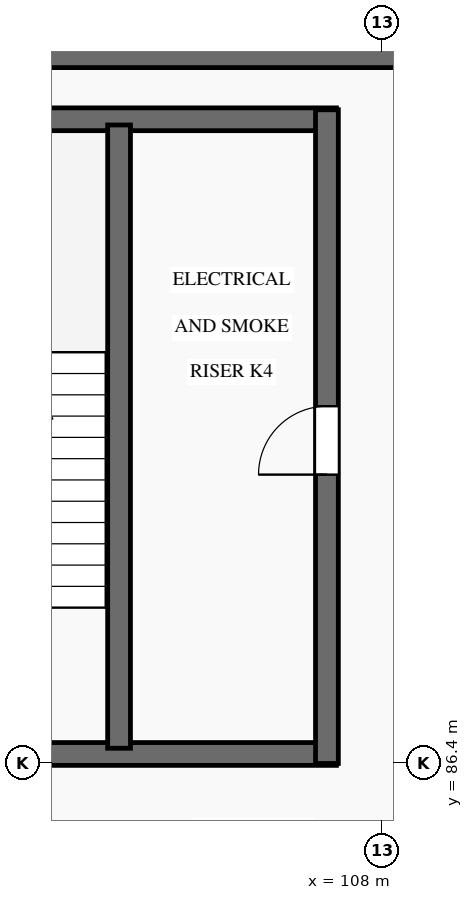
"""IFC4 building model, lengths in metres.
Left out: names, types, materials, properties, quantities, classifications, styles, units other than length and angle.
Written with IfcOpenShell. Run it as: python <this file> out.ifc"""

import sys

from ifc_helpers import new_model, si_unit, direction, frame, frame_2d, origin, place, context, subcontext, project, spatial, rectangle, extrude, element, fill, save


model = new_model("IFC4")
c1 = context("Model", 3, precision=1e-05, world=origin(), true_north=direction((0.0, 1.0)))
c2 = subcontext(c1, "Body", "Model", "MODEL_VIEW")
j1 = project(units=[si_unit("LENGTHUNIT", "METRE"), si_unit("PLANEANGLEUNIT", "RADIAN")], contexts=[c1])
p1 = place(None, origin())
s1 = spatial("IfcSite", under=j1, at=p1, CompositionType="ELEMENT")
p2 = place(p1, origin())
s2 = spatial("IfcBuilding", under=s1, at=p2, CompositionType="ELEMENT")
p3 = place(p2, frame((0.0, 0.0, -4.5)))
s3 = spatial("IfcBuildingStorey", under=s2, at=p3, CompositionType="ELEMENT", Elevation=-4.5)
p4 = place(p3, frame((116.78, 95.78, 0.0), z_axis=(0.0, 0.0, 1.0), x_axis=(-1.0, 0.0, 0.0)))
e1 = element("IfcWall", 1, at=p4, inside=s3, PredefinedType="SHEAR", context=c2, shape_type="SweptSolid", body=[
    extrude(rectangle(XDim=44.4, YDim=0.45, at=frame_2d((22.2, 0.0))), origin(), (0.0, 0.0, 1.0), 4.2),
])
for number, where, z_axis, x_axis in (
    (2, (100.4, 86.525, 0.0), (0.0, 0.0, 1.0), (1.0, 0.0, 0.0)),
    (3, (100.4, 94.875, 0.0), (0.0, 0.0, 1.0), (1.0, 0.0, 0.0)),
):
    element("IfcWall", number, at=place(p3, frame(where, z_axis=z_axis, x_axis=x_axis)), inside=s3, PredefinedType="SHEAR", context=c2, shape_type="SweptSolid", body=[
        extrude(rectangle(XDim=7.0, YDim=0.3, at=frame_2d((3.5, 0.0))), origin(), (0.0, 0.0, 1.0), 4.5),
    ])
p5 = place(p3, frame((107.275, 86.4, 0.0), z_axis=(0.0, 0.0, 1.0), x_axis=(0.0, 1.0, 0.0)))
e4 = element("IfcWall", 4, at=p5, inside=s3, PredefinedType="SHEAR", context=c2, shape_type="SweptSolid", body=[
    extrude(rectangle(XDim=8.6, YDim=0.3, at=frame_2d((4.3, 0.0))), origin(), (0.0, 0.0, 1.0), 4.5),
])
p6 = place(p5, frame((3.8, 0.0, 0.0)))
e5 = element("IfcOpeningElement", 5, at=p6, cuts=e4, PredefinedType="OPENING", context=c2, shape_type="SweptSolid", body=[
    extrude(rectangle(XDim=0.9, YDim=2.05, at=frame_2d((0.45, 1.025))), frame((0.0, 0.165, 0.0), z_axis=(0.0, -1.0, 0.0), x_axis=(1.0, 0.0, 0.0)), (0.0, 0.0, 1.0), 0.33),
])
p7 = place(p3, frame((104.54, 86.6, 0.0), z_axis=(0.0, 0.0, 1.0), x_axis=(0.0, 1.0, 0.0)))
e6 = element("IfcWall", 6, at=p7, inside=s3, PredefinedType="SHEAR", context=c2, shape_type="SweptSolid", body=[
    extrude(rectangle(XDim=8.2, YDim=0.3, at=frame_2d((4.1, 0.0))), origin(), (0.0, 0.0, 1.0), 4.5),
])
p8 = place(p6, origin())
e7 = element("IfcDoor", 7, at=p8, inside=s3, OperationType="SINGLE_SWING_LEFT", PredefinedType="DOOR", context=c2, shape_type="SweptSolid", body=[
    extrude(rectangle(XDim=0.9, YDim=2.05, at=frame_2d((0.45, 1.025))), frame((0.0, 0.025, 0.0), z_axis=(0.0, -1.0, 0.0), x_axis=(1.0, 0.0, 0.0)), (0.0, 0.0, 1.0), 0.05),
])
fill(e5, e7)
save(model, sys.argv[1])
